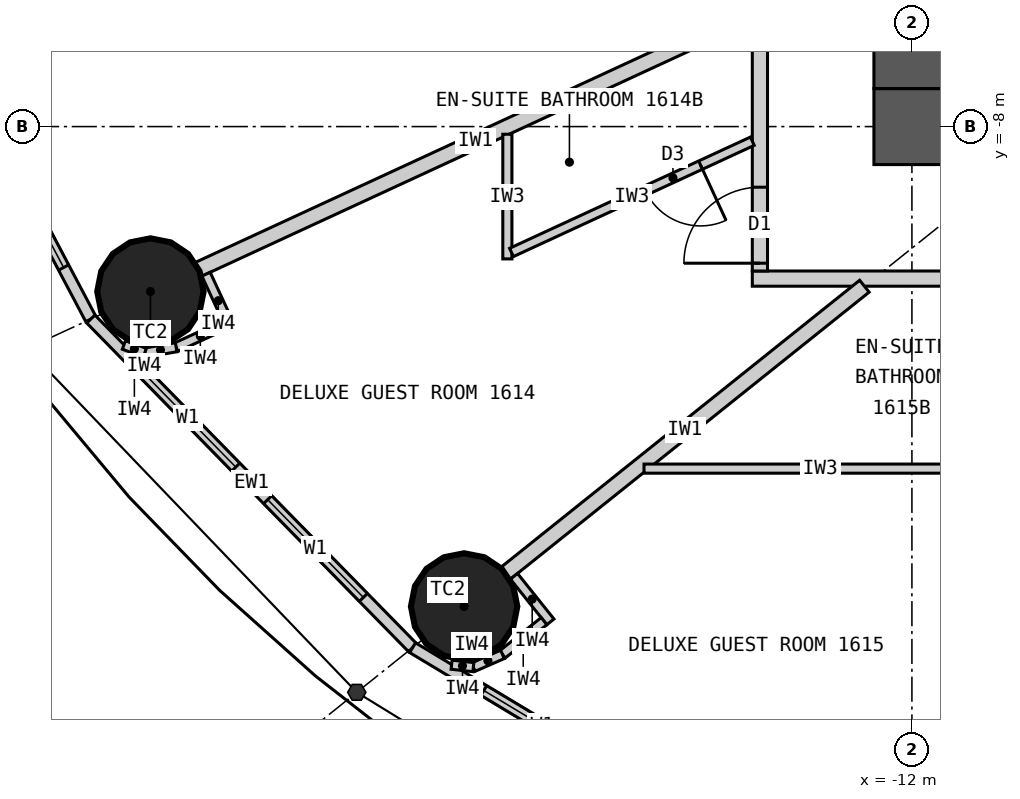
"""IFC4 building model, lengths in metres.
Left out: names, types, materials, properties, quantities, classifications, styles, units other than length and angle.
Written with IfcOpenShell. Run it as: python <this file> out.ifc"""

import sys

from ifc_helpers import new_model, si_unit, direction, frame, frame_2d, origin, origin_2d, place, context, subcontext, project, spatial, rectangle, circle, extrude, element, fill, save


model = new_model("IFC4")
c1 = context("Model", 3, precision=1e-05, world=origin(), true_north=direction((0.0, 1.0)))
c2 = subcontext(c1, "Body", "Model", "MODEL_VIEW")
j1 = project(units=[si_unit("LENGTHUNIT", "METRE"), si_unit("PLANEANGLEUNIT", "RADIAN")], contexts=[c1])
p1 = place(None, origin())
s1 = spatial("IfcSite", under=j1, at=p1, CompositionType="ELEMENT")
p2 = place(p1, origin())
s2 = spatial("IfcBuilding", under=s1, at=p2, CompositionType="ELEMENT")
p3 = place(p2, frame((0.0, 0.0, 67.2)))
s3 = spatial("IfcBuildingStorey", under=s2, at=p3, CompositionType="ELEMENT", Elevation=67.2)
for number, where, z_axis, x_axis in (
    (1, (-22.019, -10.17, 0.0), (0.0, 0.0, 1.0), (1.0, 0.0, 0.0)),
    (2, (-17.892, -14.313, 0.0), (0.0, 0.0, 1.0), (1.0, 0.0, 0.0)),
):
    element("IfcColumn", number, at=place(p3, frame(where, z_axis=z_axis, x_axis=x_axis)), inside=s3, PredefinedType="COLUMN", context=c2, shape_type="SweptSolid", body=[
        extrude(circle(Radius=0.7, at=origin_2d()), origin(), (0.0, 0.0, 1.0), 3.3),
    ])
p4 = place(p3, frame((12.5, -8.0, 0.0), z_axis=(0.0, 0.0, 1.0), x_axis=(-1.0, 0.0, 0.0)))
e3 = element("IfcWall", 3, at=p4, inside=s3, PredefinedType="SHEAR", context=c2, shape_type="SweptSolid", body=[
    extrude(rectangle(XDim=25.0, YDim=1.0, at=frame_2d((12.5, 0.0))), origin(), (0.0, 0.0, 1.0), 3.3),
])
p5 = place(p4, frame((11.2, 0.0, 0.0)))
e4 = element("IfcOpeningElement", 4, at=p5, cuts=e3, PredefinedType="OPENING", context=c2, shape_type="SweptSolid", body=[
    extrude(rectangle(XDim=1.2, YDim=2.2, at=frame_2d((0.6, 1.1))), frame((0.0, 0.51, 0.0), z_axis=(0.0, -1.0, 0.0), x_axis=(1.0, 0.0, 0.0)), (0.0, 0.0, 1.0), 1.02),
])
p6 = place(p4, frame((18.8, 0.0, 0.0)))
e5 = element("IfcOpeningElement", 5, at=p6, cuts=e3, PredefinedType="OPENING", context=c2, shape_type="SweptSolid", body=[
    extrude(rectangle(XDim=0.9, YDim=2.2, at=frame_2d((0.45, 1.1))), frame((0.0, 0.51, 0.0), z_axis=(0.0, -1.0, 0.0), x_axis=(1.0, 0.0, 0.0)), (0.0, 0.0, 1.0), 1.02),
])
p7 = place(p3, frame((-12.0, 7.5, 0.0), z_axis=(0.0, 0.0, 1.0), x_axis=(0.0, -1.0, 0.0)))
e6 = element("IfcWall", 6, at=p7, inside=s3, PredefinedType="SHEAR", context=c2, shape_type="SweptSolid", body=[
    extrude(rectangle(XDim=15.0, YDim=1.0, at=frame_2d((7.5, 0.0))), origin(), (0.0, 0.0, 1.0), 3.3),
])
p8 = place(p7, frame((6.6, 0.0, 0.0)))
e7 = element("IfcOpeningElement", 7, at=p8, cuts=e6, PredefinedType="OPENING", context=c2, shape_type="SweptSolid", body=[
    extrude(rectangle(XDim=1.8, YDim=2.2, at=frame_2d((0.9, 1.1))), frame((0.0, 0.51, 0.0), z_axis=(0.0, -1.0, 0.0), x_axis=(1.0, 0.0, 0.0)), (0.0, 0.0, 1.0), 1.02),
])
p9 = place(p3, frame((-25.482, -5.462, 0.0), z_axis=(0.0, 0.0, 1.0), x_axis=(0.467296867008, -0.884100468321, 0.0)))
e8 = element("IfcWall", 8, at=p9, inside=s3, PredefinedType="ELEMENTEDWALL", context=c2, shape_type="SweptSolid", body=[
    extrude(rectangle(XDim=5.734, YDim=0.15, at=frame_2d((2.867, 0.0))), origin(), (0.0, 0.0, 1.0), 3.12),
])
p10 = place(p9, frame((0.767, 0.0, 0.9)))
e9 = element("IfcOpeningElement", 9, at=p10, cuts=e8, PredefinedType="OPENING", context=c2, shape_type="SweptSolid", body=[
    extrude(rectangle(XDim=1.8, YDim=1.9, at=frame_2d((0.9, 0.95))), frame((0.0, 0.085, 0.0), z_axis=(0.0, -1.0, 0.0), x_axis=(1.0, 0.0, 0.0)), (0.0, 0.0, 1.0), 0.17),
])
p11 = place(p9, frame((3.167, 0.0, 0.9)))
e10 = element("IfcOpeningElement", 10, at=p11, cuts=e8, PredefinedType="OPENING", context=c2, shape_type="SweptSolid", body=[
    extrude(rectangle(XDim=1.8, YDim=1.9, at=frame_2d((0.9, 0.95))), frame((0.0, 0.085, 0.0), z_axis=(0.0, -1.0, 0.0), x_axis=(1.0, 0.0, 0.0)), (0.0, 0.0, 1.0), 0.17),
])
p12 = place(p3, frame((-22.803, -10.532, 0.0), z_axis=(0.0, 0.0, 1.0), x_axis=(0.699602905915, -0.714531856557, 0.0)))
e11 = element("IfcWall", 11, at=p12, inside=s3, PredefinedType="ELEMENTEDWALL", context=c2, shape_type="SweptSolid", body=[
    extrude(rectangle(XDim=6.051, YDim=0.15, at=frame_2d((3.025, 0.0))), origin(), (0.0, 0.0, 1.0), 3.12),
])
p13 = place(p12, frame((0.926, 0.0, 0.9)))
e12 = element("IfcOpeningElement", 12, at=p13, cuts=e11, PredefinedType="OPENING", context=c2, shape_type="SweptSolid", body=[
    extrude(rectangle(XDim=1.8, YDim=1.9, at=frame_2d((0.9, 0.95))), frame((0.0, 0.085, 0.0), z_axis=(0.0, -1.0, 0.0), x_axis=(1.0, 0.0, 0.0)), (0.0, 0.0, 1.0), 0.17),
])
p14 = place(p12, frame((3.325, 0.0, 0.9)))
e13 = element("IfcOpeningElement", 13, at=p14, cuts=e11, PredefinedType="OPENING", context=c2, shape_type="SweptSolid", body=[
    extrude(rectangle(XDim=1.8, YDim=1.9, at=frame_2d((0.9, 0.95))), frame((0.0, 0.085, 0.0), z_axis=(0.0, -1.0, 0.0), x_axis=(1.0, 0.0, 0.0)), (0.0, 0.0, 1.0), 0.17),
])
p15 = place(p3, frame((-18.57, -14.856, 0.0), z_axis=(0.0, 0.0, 1.0), x_axis=(0.856983180864, -0.515344377787, 0.0)))
e14 = element("IfcWall", 14, at=p15, inside=s3, PredefinedType="ELEMENTEDWALL", context=c2, shape_type="SweptSolid", body=[
    extrude(rectangle(XDim=6.386, YDim=0.15, at=frame_2d((3.193, 0.0))), origin(), (0.0, 0.0, 1.0), 3.12),
])
p16 = place(p15, frame((1.093, 0.0, 0.9)))
e15 = element("IfcOpeningElement", 15, at=p16, cuts=e14, PredefinedType="OPENING", context=c2, shape_type="SweptSolid", body=[
    extrude(rectangle(XDim=1.8, YDim=1.9, at=frame_2d((0.9, 0.95))), frame((0.0, 0.085, 0.0), z_axis=(0.0, -1.0, 0.0), x_axis=(1.0, 0.0, 0.0)), (0.0, 0.0, 1.0), 0.17),
])
p17 = place(p15, frame((3.493, 0.0, 0.9)))
e16 = element("IfcOpeningElement", 16, at=p17, cuts=e14, PredefinedType="OPENING", context=c2, shape_type="SweptSolid", body=[
    extrude(rectangle(XDim=1.8, YDim=1.9, at=frame_2d((0.9, 0.95))), frame((0.0, 0.085, 0.0), z_axis=(0.0, -1.0, 0.0), x_axis=(1.0, 0.0, 0.0)), (0.0, 0.0, 1.0), 0.17),
])
p18 = place(p3, frame((14.1, -10.0, 0.0), z_axis=(0.0, 0.0, 1.0), x_axis=(-1.0, 0.0, 0.0)))
e17 = element("IfcWall", 17, at=p18, inside=s3, PredefinedType="PARTITIONING", context=c2, shape_type="SweptSolid", body=[
    extrude(rectangle(XDim=28.2, YDim=0.2, at=frame_2d((14.1, 0.0))), origin(), (0.0, 0.0, 1.0), 3.12),
])
p19 = place(p18, frame((23.865, 0.0, 0.0)))
e18 = element("IfcOpeningElement", 18, at=p19, cuts=e17, PredefinedType="OPENING", context=c2, shape_type="SweptSolid", body=[
    extrude(rectangle(XDim=1.0, YDim=2.2, at=frame_2d((0.5, 1.1))), frame((0.0, 0.11, 0.0), z_axis=(0.0, -1.0, 0.0), x_axis=(1.0, 0.0, 0.0)), (0.0, 0.0, 1.0), 0.22),
])
p20 = place(p18, frame((18.529, 0.0, 0.0)))
e19 = element("IfcOpeningElement", 19, at=p20, cuts=e17, PredefinedType="OPENING", context=c2, shape_type="SweptSolid", body=[
    extrude(rectangle(XDim=1.0, YDim=2.2, at=frame_2d((0.5, 1.1))), frame((0.0, 0.11, 0.0), z_axis=(0.0, -1.0, 0.0), x_axis=(1.0, 0.0, 0.0)), (0.0, 0.0, 1.0), 0.22),
])
p21 = place(p18, frame((14.623, 0.0, 0.0)))
e20 = element("IfcOpeningElement", 20, at=p21, cuts=e17, PredefinedType="OPENING", context=c2, shape_type="SweptSolid", body=[
    extrude(rectangle(XDim=1.0, YDim=2.2, at=frame_2d((0.5, 1.1))), frame((0.0, 0.11, 0.0), z_axis=(0.0, -1.0, 0.0), x_axis=(1.0, 0.0, 0.0)), (0.0, 0.0, 1.0), 0.22),
])
p22 = place(p18, frame((11.24, 0.0, 0.0)))
e21 = element("IfcOpeningElement", 21, at=p22, cuts=e17, PredefinedType="OPENING", context=c2, shape_type="SweptSolid", body=[
    extrude(rectangle(XDim=1.0, YDim=2.2, at=frame_2d((0.5, 1.1))), frame((0.0, 0.11, 0.0), z_axis=(0.0, -1.0, 0.0), x_axis=(1.0, 0.0, 0.0)), (0.0, 0.0, 1.0), 0.22),
])
p23 = place(p18, frame((8.671, 0.0, 0.0)))
e22 = element("IfcOpeningElement", 22, at=p23, cuts=e17, PredefinedType="OPENING", context=c2, shape_type="SweptSolid", body=[
    extrude(rectangle(XDim=1.0, YDim=2.2, at=frame_2d((0.5, 1.1))), frame((0.0, 0.11, 0.0), z_axis=(0.0, -1.0, 0.0), x_axis=(1.0, 0.0, 0.0)), (0.0, 0.0, 1.0), 0.22),
])
p24 = place(p18, frame((2.801, 0.0, 0.0)))
e23 = element("IfcOpeningElement", 23, at=p24, cuts=e17, PredefinedType="OPENING", context=c2, shape_type="SweptSolid", body=[
    extrude(rectangle(XDim=1.0, YDim=2.2, at=frame_2d((0.5, 1.1))), frame((0.0, 0.11, 0.0), z_axis=(0.0, -1.0, 0.0), x_axis=(1.0, 0.0, 0.0)), (0.0, 0.0, 1.0), 0.22),
])
p25 = place(p3, frame((-14.0, 9.9, 0.0), z_axis=(0.0, 0.0, 1.0), x_axis=(0.0, -1.0, 0.0)))
e24 = element("IfcWall", 24, at=p25, inside=s3, PredefinedType="PARTITIONING", context=c2, shape_type="SweptSolid", body=[
    extrude(rectangle(XDim=19.8, YDim=0.2, at=frame_2d((9.9, 0.0))), origin(), (0.0, 0.0, 1.0), 3.12),
])
p26 = place(p25, frame((0.103, 0.0, 0.0)))
e25 = element("IfcOpeningElement", 25, at=p26, cuts=e24, PredefinedType="OPENING", context=c2, shape_type="SweptSolid", body=[
    extrude(rectangle(XDim=1.0, YDim=2.2, at=frame_2d((0.5, 1.1))), frame((0.0, 0.11, 0.0), z_axis=(0.0, -1.0, 0.0), x_axis=(1.0, 0.0, 0.0)), (0.0, 0.0, 1.0), 0.22),
])
p27 = place(p25, frame((5.248, 0.0, 0.0)))
e26 = element("IfcOpeningElement", 26, at=p27, cuts=e24, PredefinedType="OPENING", context=c2, shape_type="SweptSolid", body=[
    extrude(rectangle(XDim=1.0, YDim=2.2, at=frame_2d((0.5, 1.1))), frame((0.0, 0.11, 0.0), z_axis=(0.0, -1.0, 0.0), x_axis=(1.0, 0.0, 0.0)), (0.0, 0.0, 1.0), 0.22),
])
p28 = place(p25, frame((9.438, 0.0, 0.0)))
e27 = element("IfcOpeningElement", 27, at=p28, cuts=e24, PredefinedType="OPENING", context=c2, shape_type="SweptSolid", body=[
    extrude(rectangle(XDim=1.0, YDim=2.2, at=frame_2d((0.5, 1.1))), frame((0.0, 0.11, 0.0), z_axis=(0.0, -1.0, 0.0), x_axis=(1.0, 0.0, 0.0)), (0.0, 0.0, 1.0), 0.22),
])
p29 = place(p25, frame((13.942, 0.0, 0.0)))
e28 = element("IfcOpeningElement", 28, at=p29, cuts=e24, PredefinedType="OPENING", context=c2, shape_type="SweptSolid", body=[
    extrude(rectangle(XDim=1.0, YDim=2.2, at=frame_2d((0.5, 1.1))), frame((0.0, 0.11, 0.0), z_axis=(0.0, -1.0, 0.0), x_axis=(1.0, 0.0, 0.0)), (0.0, 0.0, 1.0), 0.22),
])
p30 = place(p25, frame((18.698, 0.0, 0.0)))
e29 = element("IfcOpeningElement", 29, at=p30, cuts=e24, PredefinedType="OPENING", context=c2, shape_type="SweptSolid", body=[
    extrude(rectangle(XDim=1.0, YDim=2.2, at=frame_2d((0.5, 1.1))), frame((0.0, 0.11, 0.0), z_axis=(0.0, -1.0, 0.0), x_axis=(1.0, 0.0, 0.0)), (0.0, 0.0, 1.0), 0.22),
])
p31 = place(p3, frame((-14.1, -6.512, 0.0), z_axis=(0.0, 0.0, 1.0), x_axis=(-0.907832871056, -0.419332181247, 0.0)))
e30 = element("IfcWall", 30, at=p31, inside=s3, PredefinedType="PARTITIONING", context=c2, shape_type="SweptSolid", body=[
    extrude(rectangle(XDim=8.023, YDim=0.2, at=frame_2d((4.011, 0.0))), origin(), (0.0, 0.0, 1.0), 2.32),
])
p32 = place(p3, frame((-12.625, -10.1, 0.0), z_axis=(0.0, 0.0, 1.0), x_axis=(-0.780892451574, -0.624665493744, 0.0)))
e31 = element("IfcWall", 31, at=p32, inside=s3, PredefinedType="PARTITIONING", context=c2, shape_type="SweptSolid", body=[
    extrude(rectangle(XDim=6.045, YDim=0.2, at=frame_2d((3.022, 0.0))), origin(), (0.0, 0.0, 1.0), 2.32),
])
p33 = place(p3, frame((-7.289, -10.1, 0.0), z_axis=(0.0, 0.0, 1.0), x_axis=(-0.585198353053, -0.810890182197, 0.0)))
e32 = element("IfcWall", 32, at=p33, inside=s3, PredefinedType="PARTITIONING", context=c2, shape_type="SweptSolid", body=[
    extrude(rectangle(XDim=8.36, YDim=0.2, at=frame_2d((4.18, 0.0))), origin(), (0.0, 0.0, 1.0), 2.32),
])
p34 = place(p3, frame((-17.323, -8.101, 0.0), z_axis=(0.0, 0.0, 1.0), x_axis=(0.0, -1.0, 0.0)))
e33 = element("IfcWall", 33, at=p34, inside=s3, PredefinedType="PARTITIONING", context=c2, shape_type="SweptSolid", body=[
    extrude(rectangle(XDim=1.64, YDim=0.12, at=frame_2d((0.82, 0.0))), origin(), (0.0, 0.0, 1.0), 3.12),
])
p35 = place(p3, frame((-14.1, -8.193, 0.0), z_axis=(0.0, 0.0, 1.0), x_axis=(-0.907836493557, -0.419324338628, 0.0)))
e34 = element("IfcWall", 34, at=p35, inside=s3, PredefinedType="PARTITIONING", context=c2, shape_type="SweptSolid", body=[
    extrude(rectangle(XDim=3.49, YDim=0.12, at=frame_2d((1.745, 0.0))), origin(), (0.0, 0.0, 1.0), 3.12),
])
p36 = place(p35, frame((0.75, 0.0, 0.0)))
e35 = element("IfcOpeningElement", 35, at=p36, cuts=e34, PredefinedType="OPENING", context=c2, shape_type="SweptSolid", body=[
    extrude(rectangle(XDim=0.8, YDim=2.1, at=frame_2d((0.4, 1.05))), frame((0.0, 0.07, 0.0), z_axis=(0.0, -1.0, 0.0), x_axis=(1.0, 0.0, 0.0)), (0.0, 0.0, 1.0), 0.14),
])
p37 = place(p3, frame((-15.525, -12.5, 0.0), z_axis=(0.0, 0.0, 1.0), x_axis=(1.0, 0.0, 0.0)))
e36 = element("IfcWall", 36, at=p37, inside=s3, PredefinedType="PARTITIONING", context=c2, shape_type="SweptSolid", body=[
    extrude(rectangle(XDim=4.64, YDim=0.12, at=frame_2d((2.32, 0.0))), origin(), (0.0, 0.0, 1.0), 3.12),
])
p38 = place(p3, frame((-21.287, -9.942, 0.0), z_axis=(0.0, 0.0, 1.0), x_axis=(0.419259891039, -0.907866258744, 0.0)))
e37 = element("IfcWall", 37, at=p38, inside=s3, PredefinedType="PARTITIONING", context=c2, shape_type="SweptSolid", body=[
    extrude(rectangle(XDim=0.768, YDim=0.12, at=frame_2d((0.384, 0.0))), origin(), (0.0, 0.0, 1.0), 3.12),
])
p39 = place(p3, frame((-21.045, -10.61, 0.0), z_axis=(0.0, 0.0, 1.0), x_axis=(-0.907877701396, -0.419235112208, 0.0)))
e38 = element("IfcWall", 38, at=p39, inside=s3, PredefinedType="PARTITIONING", context=c2, shape_type="SweptSolid", body=[
    extrude(rectangle(XDim=0.7, YDim=0.12, at=frame_2d((0.35, 0.0))), origin(), (0.0, 0.0, 1.0), 3.12),
])
p40 = place(p3, frame((-21.68, -10.903, 0.0), z_axis=(0.0, 0.0, 1.0), x_axis=(-0.985446622073, -0.169985161247, 0.0)))
e39 = element("IfcWall", 39, at=p40, inside=s3, PredefinedType="PARTITIONING", context=c2, shape_type="SweptSolid", body=[
    extrude(rectangle(XDim=0.418, YDim=0.12, at=frame_2d((0.209, 0.0))), origin(), (0.0, 0.0, 1.0), 3.12),
])
p41 = place(p3, frame((-22.092, -10.974, 0.0), z_axis=(0.0, 0.0, 1.0), x_axis=(-0.938428160676, 0.345474437912, 0.0)))
e40 = element("IfcWall", 40, at=p41, inside=s3, PredefinedType="PARTITIONING", context=c2, shape_type="SweptSolid", body=[
    extrude(rectangle(XDim=0.294, YDim=0.12, at=frame_2d((0.147, 0.0))), origin(), (0.0, 0.0, 1.0), 3.12),
])
p42 = place(p3, frame((-17.236, -13.917, 0.0), z_axis=(0.0, 0.0, 1.0), x_axis=(0.624695047554, -0.780868809443, 0.0)))
e41 = element("IfcWall", 41, at=p42, inside=s3, PredefinedType="PARTITIONING", context=c2, shape_type="SweptSolid", body=[
    extrude(rectangle(XDim=0.768, YDim=0.12, at=frame_2d((0.384, 0.0))), origin(), (0.0, 0.0, 1.0), 3.12),
])
p43 = place(p3, frame((-16.841, -14.507, 0.0), z_axis=(0.0, 0.0, 1.0), x_axis=(-0.780902834923, -0.62465251333, 0.0)))
e42 = element("IfcWall", 42, at=p43, inside=s3, PredefinedType="PARTITIONING", context=c2, shape_type="SweptSolid", body=[
    extrude(rectangle(XDim=0.7, YDim=0.12, at=frame_2d((0.35, 0.0))), origin(), (0.0, 0.0, 1.0), 3.12),
])
p44 = place(p3, frame((-17.387, -14.944, 0.0), z_axis=(0.0, 0.0, 1.0), x_axis=(-0.916036698064, -0.401094462441, 0.0)))
e43 = element("IfcWall", 43, at=p44, inside=s3, PredefinedType="PARTITIONING", context=c2, shape_type="SweptSolid", body=[
    extrude(rectangle(XDim=0.418, YDim=0.12, at=frame_2d((0.209, 0.0))), origin(), (0.0, 0.0, 1.0), 3.12),
])
p45 = place(p3, frame((-17.77, -15.112, 0.0), z_axis=(0.0, 0.0, 1.0), x_axis=(-0.993904401174, 0.110245368731, 0.0)))
e44 = element("IfcWall", 44, at=p45, inside=s3, PredefinedType="PARTITIONING", context=c2, shape_type="SweptSolid", body=[
    extrude(rectangle(XDim=0.288, YDim=0.12, at=frame_2d((0.144, 0.0))), origin(), (0.0, 0.0, 1.0), 3.12),
])
p46 = place(p11, origin())
e45 = element("IfcWindow", 45, at=p46, inside=s3, PartitioningType="SINGLE_PANEL", PredefinedType="WINDOW", context=c2, shape_type="SweptSolid", body=[
    extrude(rectangle(XDim=1.8, YDim=1.9, at=frame_2d((0.9, 0.95))), frame((0.0, 0.03, 0.0), z_axis=(0.0, -1.0, 0.0), x_axis=(1.0, 0.0, 0.0)), (0.0, 0.0, 1.0), 0.06),
])
fill(e10, e45)
p47 = place(p13, origin())
e46 = element("IfcWindow", 46, at=p47, inside=s3, PartitioningType="SINGLE_PANEL", PredefinedType="WINDOW", context=c2, shape_type="SweptSolid", body=[
    extrude(rectangle(XDim=1.8, YDim=1.9, at=frame_2d((0.9, 0.95))), frame((0.0, 0.03, 0.0), z_axis=(0.0, -1.0, 0.0), x_axis=(1.0, 0.0, 0.0)), (0.0, 0.0, 1.0), 0.06),
])
fill(e12, e46)
p48 = place(p14, origin())
e47 = element("IfcWindow", 47, at=p48, inside=s3, PartitioningType="SINGLE_PANEL", PredefinedType="WINDOW", context=c2, shape_type="SweptSolid", body=[
    extrude(rectangle(XDim=1.8, YDim=1.9, at=frame_2d((0.9, 0.95))), frame((0.0, 0.03, 0.0), z_axis=(0.0, -1.0, 0.0), x_axis=(1.0, 0.0, 0.0)), (0.0, 0.0, 1.0), 0.06),
])
fill(e13, e47)
p49 = place(p16, origin())
e48 = element("IfcWindow", 48, at=p49, inside=s3, PartitioningType="SINGLE_PANEL", PredefinedType="WINDOW", context=c2, shape_type="SweptSolid", body=[
    extrude(rectangle(XDim=1.8, YDim=1.9, at=frame_2d((0.9, 0.95))), frame((0.0, 0.03, 0.0), z_axis=(0.0, -1.0, 0.0), x_axis=(1.0, 0.0, 0.0)), (0.0, 0.0, 1.0), 0.06),
])
fill(e15, e48)
p50 = place(p36, origin())
e49 = element("IfcDoor", 49, at=p50, inside=s3, OperationType="SINGLE_SWING_LEFT", PredefinedType="DOOR", context=c2, shape_type="SweptSolid", body=[
    extrude(rectangle(XDim=0.8, YDim=2.1, at=frame_2d((0.4, 1.05))), frame((0.0, 0.025, 0.0), z_axis=(0.0, -1.0, 0.0), x_axis=(1.0, 0.0, 0.0)), (0.0, 0.0, 1.0), 0.05),
])
fill(e35, e49)
p51 = place(p30, origin())
e50 = element("IfcDoor", 50, at=p51, inside=s3, OperationType="SINGLE_SWING_RIGHT", PredefinedType="DOOR", context=c2, shape_type="SweptSolid", body=[
    extrude(rectangle(XDim=1.0, YDim=2.2, at=frame_2d((0.5, 1.1))), frame((0.0, 0.025, 0.0), z_axis=(0.0, -1.0, 0.0), x_axis=(1.0, 0.0, 0.0)), (0.0, 0.0, 1.0), 0.05),
])
fill(e29, e50)
save(model, sys.argv[1])
